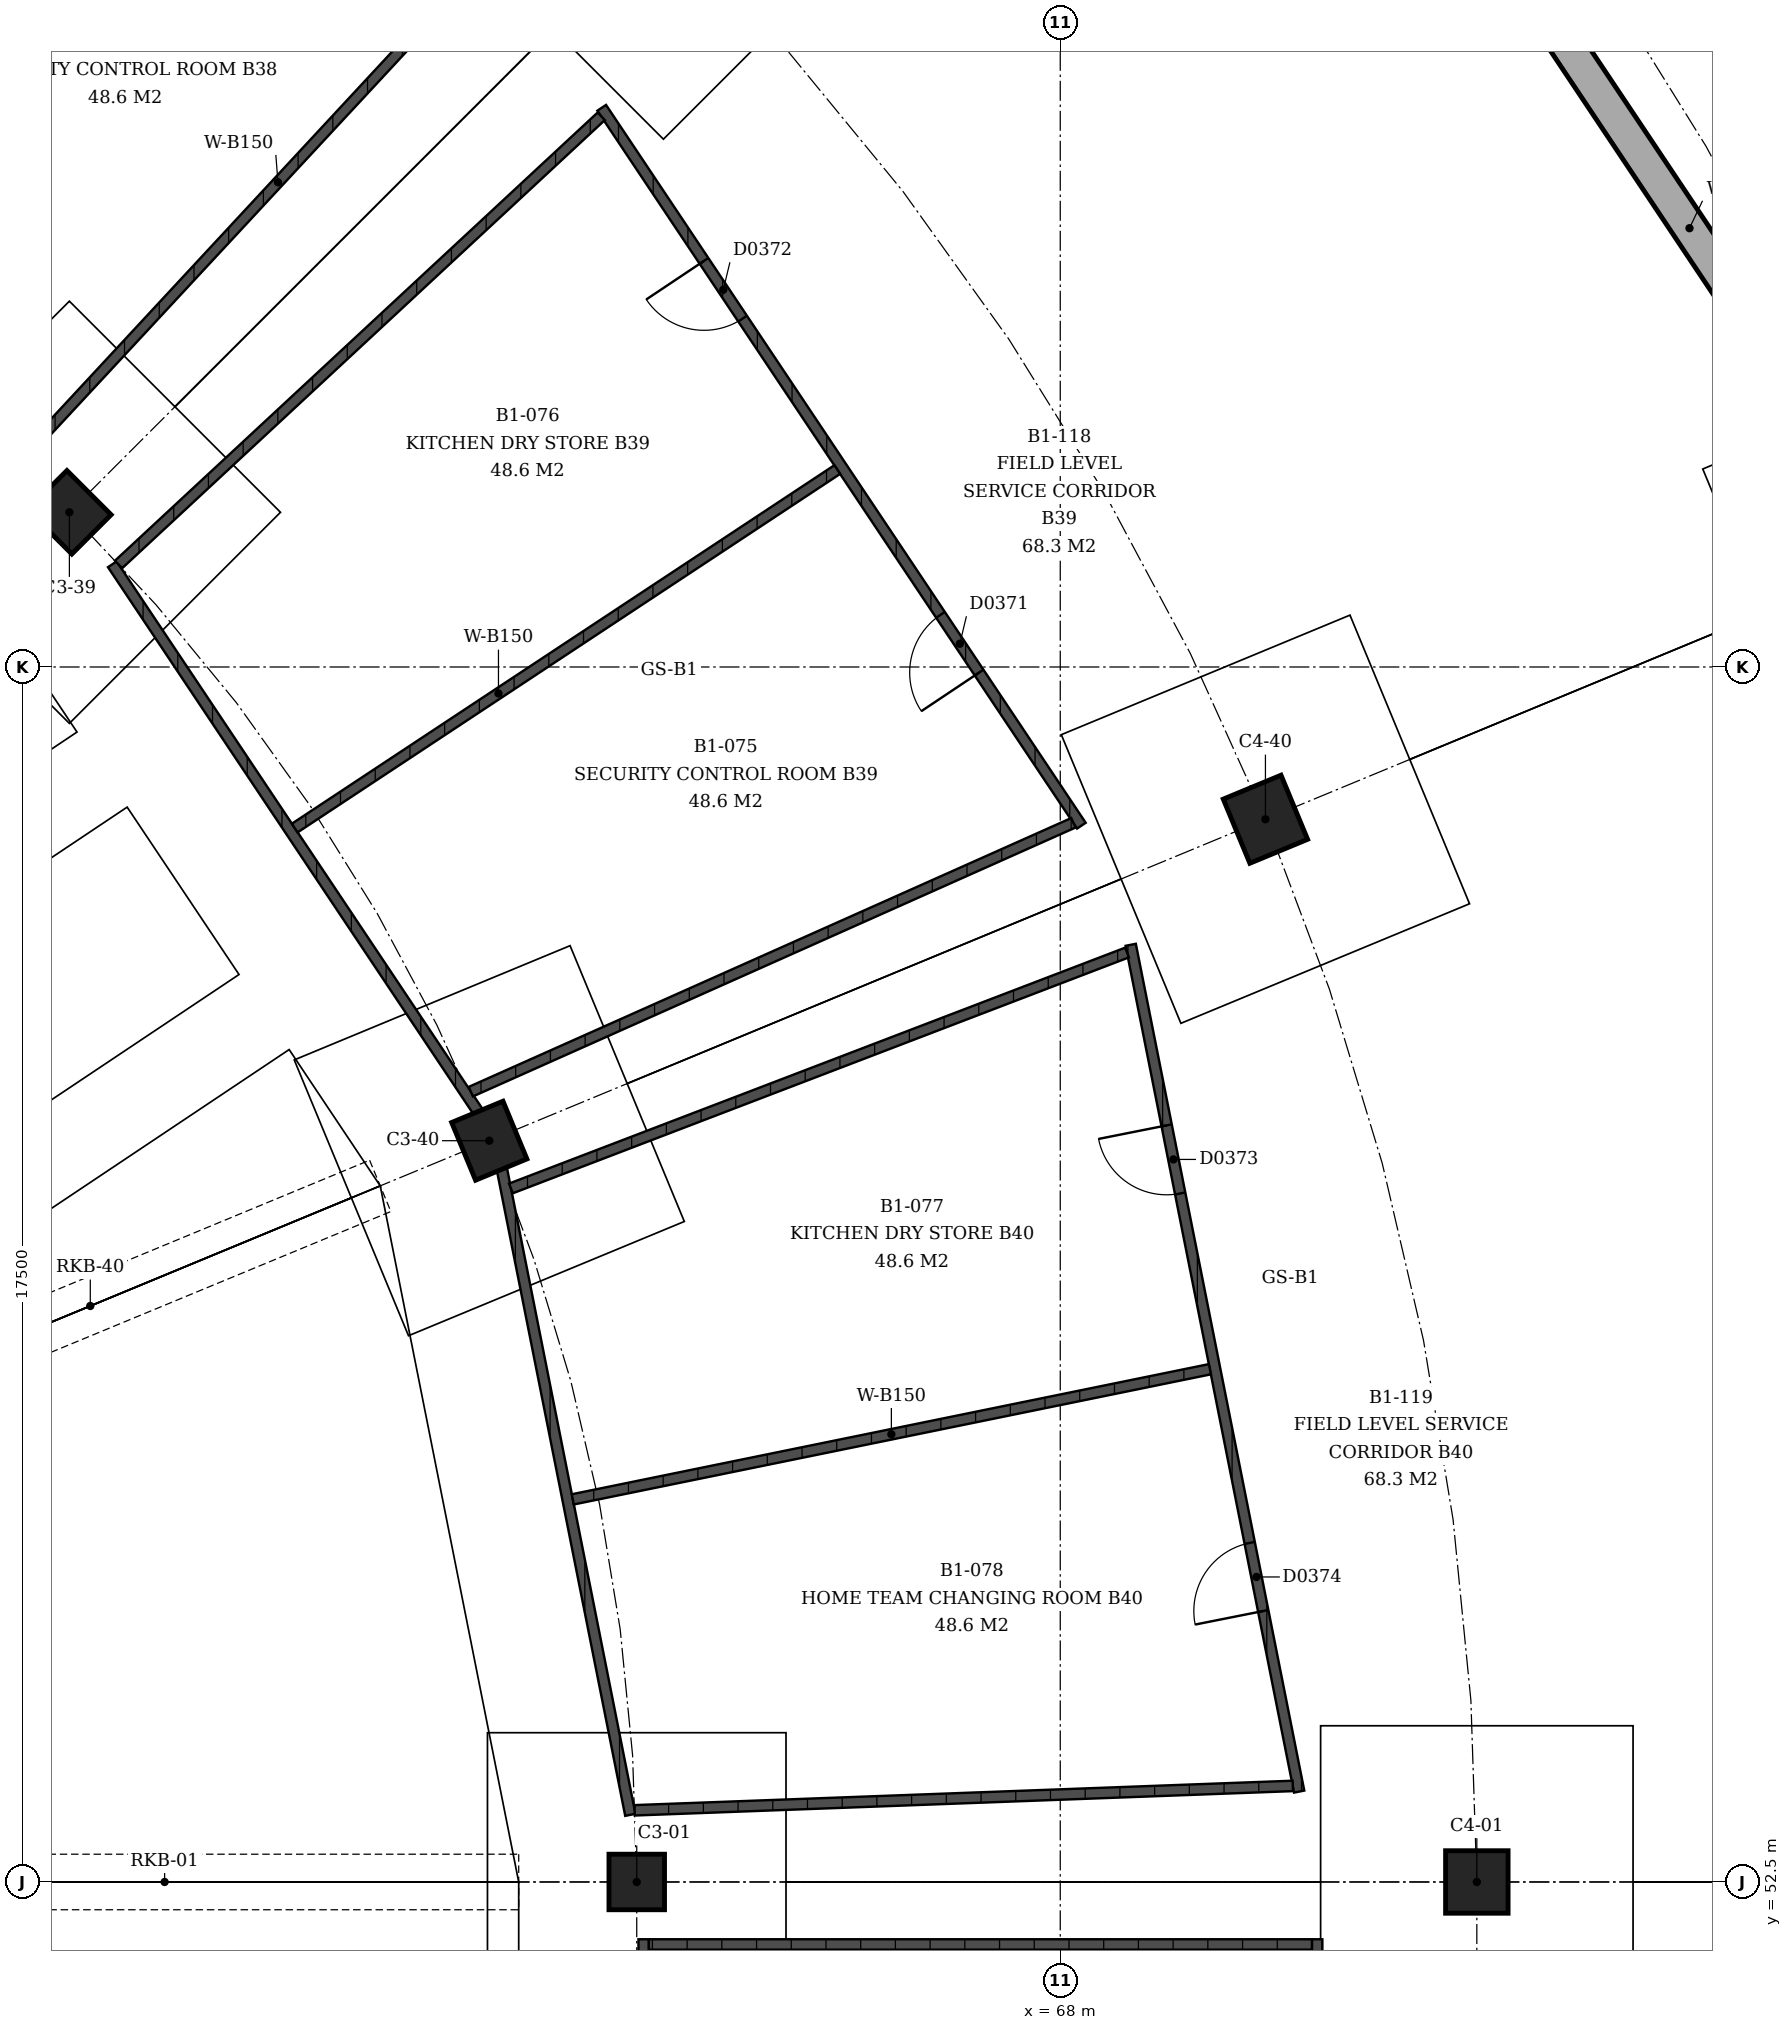
"""IFC4 building model, lengths in metres.
Left out: names, types, materials, properties, quantities, classifications, styles, units other than length and angle.
Written with IfcOpenShell. Run it as: python <this file> out.ifc"""

import sys

from ifc_helpers import new_model, si_unit, direction, frame, frame_2d, origin, origin_2d, place, context, subcontext, project, spatial, polyline, rectangle, outline, extrude, element, fill, save


model = new_model("IFC4")
c1 = context("Model", 3, precision=1e-05, world=origin(), true_north=direction((0.0, 1.0)))
c2 = subcontext(c1, "Body", "Model", "MODEL_VIEW")
j1 = project(units=[si_unit("LENGTHUNIT", "METRE"), si_unit("PLANEANGLEUNIT", "RADIAN")], contexts=[c1])
p1 = place(None, origin())
s1 = spatial("IfcSite", under=j1, at=p1, CompositionType="ELEMENT")
p2 = place(p1, origin())
s2 = spatial("IfcBuilding", under=s1, at=p2, CompositionType="ELEMENT")
p3 = place(p2, frame((0.0, 0.0, -4.5)))
s3 = spatial("IfcBuildingStorey", under=s2, at=p3, CompositionType="ELEMENT", Elevation=-4.5)
p4 = place(p3, frame((61.9, 52.5, 0.0), z_axis=(0.0, 0.0, 1.0), x_axis=(0.0, 1.0, 0.0)))
e1 = element("IfcColumn", 1, at=p4, inside=s3, PredefinedType="COLUMN", context=c2, shape_type="SweptSolid", body=[
    extrude(rectangle(XDim=0.8, YDim=0.8, at=origin_2d()), origin(), (0.0, 0.0, 1.0), 4.5),
])
p5 = place(p3, frame((74.0, 52.5, 0.0), z_axis=(0.0, 0.0, 1.0), x_axis=(0.0, 1.0, 0.0)))
e2 = element("IfcColumn", 2, at=p5, inside=s3, PredefinedType="COLUMN", context=c2, shape_type="SweptSolid", body=[
    extrude(rectangle(XDim=0.9, YDim=0.9, at=origin_2d()), origin(), (0.0, 0.0, 1.0), 4.5),
])
for number, where, z_axis, x_axis in (
    (3, (53.728, 72.228, 0.0), (0.0, 0.0, 1.0), (-0.707, 0.707, 0.0)),
    (4, (59.776, 63.177, 0.0), (0.0, 0.0, 1.0), (-0.383, 0.924, 0.0)),
):
    element("IfcColumn", number, at=place(p3, frame(where, z_axis=z_axis, x_axis=x_axis)), inside=s3, PredefinedType="COLUMN", context=c2, shape_type="SweptSolid", body=[
        extrude(rectangle(XDim=0.9, YDim=0.8, at=origin_2d()), origin(), (0.0, 0.0, 1.0), 4.5),
    ])
p6 = place(p3, frame((70.955, 67.807, 0.0), z_axis=(0.0, 0.0, 1.0), x_axis=(-0.382683432365, 0.923879532511, 0.0)))
e5 = element("IfcColumn", 5, at=p6, inside=s3, PredefinedType="COLUMN", context=c2, shape_type="SweptSolid", body=[
    extrude(rectangle(XDim=1.0, YDim=0.9, at=origin_2d()), origin(), (0.0, 0.0, 1.0), 4.5),
])
p7 = place(p3, frame((0.0, 0.0, -0.4)))
e6 = element("IfcWall", 6, at=p7, inside=s3, PredefinedType="SOLIDWALL", context=c2, shape_type="SweptSolid", body=[
    extrude(outline(polyline([(79.651, 72.005), (80.113, 72.196), (69.844, 87.566), (69.49, 87.212), (79.651, 72.005)])), origin(), (0.0, 0.0, 1.0), 3.19),
])
p8 = place(p3, frame((62.0, 38.0, 0.0), z_axis=(0.0, 0.0, 1.0), x_axis=(0.0, 1.0, 0.0)))
e7 = element("IfcWall", 7, at=p8, inside=s3, PredefinedType="SOLIDWALL", context=c2, shape_type="SweptSolid", body=[
    extrude(rectangle(XDim=13.675, YDim=0.15, at=frame_2d((6.837, 0.0))), origin(), (0.0, 0.0, 1.0), 3.0),
])
p9 = place(p3, frame((71.7, 38.325, 0.0), z_axis=(0.0, 0.0, 1.0), x_axis=(0.0, 1.0, 0.0)))
e8 = element("IfcWall", 8, at=p9, inside=s3, PredefinedType="SOLIDWALL", context=c2, shape_type="SweptSolid", body=[
    extrude(rectangle(XDim=13.35, YDim=0.15, at=frame_2d((6.675, 0.0))), origin(), (0.0, 0.0, 1.0), 3.0),
])
p10 = place(p9, frame((2.875, 0.0, 0.0)))
e9 = element("IfcOpeningElement", 9, at=p10, cuts=e8, PredefinedType="OPENING", context=c2, shape_type="SweptSolid", body=[
    extrude(rectangle(XDim=1.0, YDim=2.1, at=frame_2d((0.5, 1.05))), frame((0.0, 0.075, 0.0), z_axis=(0.0, -1.0, 0.0), x_axis=(1.0, 0.0, 0.0)), (0.0, 0.0, 1.0), 0.15),
])
p11 = place(p9, frame((9.475, 0.0, 0.0)))
e10 = element("IfcOpeningElement", 10, at=p11, cuts=e8, PredefinedType="OPENING", context=c2, shape_type="SweptSolid", body=[
    extrude(rectangle(XDim=1.0, YDim=2.1, at=frame_2d((0.5, 1.05))), frame((0.0, 0.075, 0.0), z_axis=(0.0, -1.0, 0.0), x_axis=(1.0, 0.0, 0.0)), (0.0, 0.0, 1.0), 0.15),
])
p12 = place(p3, frame((62.075, 51.6, 0.0), z_axis=(0.0, 0.0, 1.0), x_axis=(1.0, 0.0, 0.0)))
e11 = element("IfcWall", 11, at=p12, inside=s3, PredefinedType="SOLIDWALL", context=c2, shape_type="SweptSolid", body=[
    extrude(rectangle(XDim=9.55, YDim=0.15, at=frame_2d((4.775, 0.0))), origin(), (0.0, 0.0, 1.0), 3.0),
])
p13 = place(p3, frame((49.18, 75.474, 0.0), z_axis=(0.0, 0.0, 1.0), x_axis=(0.551278973714, 0.834320977287, 0.0)))
e12 = element("IfcWall", 12, at=p13, inside=s3, PredefinedType="SOLIDWALL", context=c2, shape_type="SweptSolid", body=[
    extrude(rectangle(XDim=9.366, YDim=0.15, at=frame_2d((4.683, 0.0))), origin(), (0.0, 0.0, 1.0), 3.0),
])
p14 = place(p3, frame((52.977, 72.937, 0.0), z_axis=(0.0, 0.0, 1.0), x_axis=(0.680436292727, 0.732807240371, 0.0)))
e13 = element("IfcWall", 13, at=p14, inside=s3, PredefinedType="SOLIDWALL", context=c2, shape_type="SweptSolid", body=[
    extrude(rectangle(XDim=9.487, YDim=0.15, at=frame_2d((4.743, 0.0))), origin(), (0.0, 0.0, 1.0), 3.0),
])
p15 = place(p3, frame((59.614, 63.597, 0.0), z_axis=(0.0, 0.0, 1.0), x_axis=(-0.555579425305, 0.831463470141, 0.0)))
e14 = element("IfcWall", 14, at=p15, inside=s3, PredefinedType="SOLIDWALL", context=c2, shape_type="SweptSolid", body=[
    extrude(rectangle(XDim=9.48, YDim=0.15, at=frame_2d((4.74, 0.0))), origin(), (0.0, 0.0, 1.0), 3.0),
])
p16 = place(p3, frame((68.304, 67.714, 0.0), z_axis=(0.0, 0.0, 1.0), x_axis=(-0.555560709334, 0.831475975747, 0.0)))
e15 = element("IfcWall", 15, at=p16, inside=s3, PredefinedType="SOLIDWALL", context=c2, shape_type="SweptSolid", body=[
    extrude(rectangle(XDim=12.436, YDim=0.15, at=frame_2d((6.218, 0.0))), origin(), (0.0, 0.0, 1.0), 3.0),
])
p17 = place(p16, frame((2.652, 0.0, 0.0)))
e16 = element("IfcOpeningElement", 16, at=p17, cuts=e15, PredefinedType="OPENING", context=c2, shape_type="SweptSolid", body=[
    extrude(rectangle(XDim=1.0, YDim=2.1, at=frame_2d((0.5, 1.05))), frame((0.0, 0.075, 0.0), z_axis=(0.0, -1.0, 0.0), x_axis=(1.0, 0.0, 0.0)), (0.0, 0.0, 1.0), 0.15),
])
p18 = place(p16, frame((8.784, 0.0, 0.0)))
e17 = element("IfcOpeningElement", 17, at=p18, cuts=e15, PredefinedType="OPENING", context=c2, shape_type="SweptSolid", body=[
    extrude(rectangle(XDim=1.0, YDim=2.1, at=frame_2d((0.5, 1.05))), frame((0.0, 0.075, 0.0), z_axis=(0.0, -1.0, 0.0), x_axis=(1.0, 0.0, 0.0)), (0.0, 0.0, 1.0), 0.15),
])
p19 = place(p3, frame((59.51, 63.883, 0.0), z_axis=(0.0, 0.0, 1.0), x_axis=(0.913203450279, 0.407503936666, 0.0)))
e18 = element("IfcWall", 18, at=p19, inside=s3, PredefinedType="SOLIDWALL", context=c2, shape_type="SweptSolid", body=[
    extrude(rectangle(XDim=9.502, YDim=0.15, at=frame_2d((4.751, 0.0))), origin(), (0.0, 0.0, 1.0), 3.0),
])
p20 = place(p3, frame((56.974, 67.68, 0.0), z_axis=(0.0, 0.0, 1.0), x_axis=(0.834320977287, 0.551278973714, 0.0)))
e19 = element("IfcWall", 19, at=p20, inside=s3, PredefinedType="SOLIDWALL", context=c2, shape_type="SweptSolid", body=[
    extrude(rectangle(XDim=9.366, YDim=0.15, at=frame_2d((4.683, 0.0))), origin(), (0.0, 0.0, 1.0), 3.0),
])
p21 = place(p3, frame((54.437, 71.477, 0.0), z_axis=(0.0, 0.0, 1.0), x_axis=(0.732807240371, 0.680436292727, 0.0)))
e20 = element("IfcWall", 20, at=p21, inside=s3, PredefinedType="SOLIDWALL", context=c2, shape_type="SweptSolid", body=[
    extrude(rectangle(XDim=9.487, YDim=0.15, at=frame_2d((4.743, 0.0))), origin(), (0.0, 0.0, 1.0), 3.0),
])
p22 = place(p3, frame((59.958, 62.765, 0.0), z_axis=(0.0, 0.0, 1.0), x_axis=(0.195076015612, -0.980788126016, 0.0)))
e21 = element("IfcWall", 21, at=p22, inside=s3, PredefinedType="SOLIDWALL", context=c2, shape_type="SweptSolid", body=[
    extrude(rectangle(XDim=9.48, YDim=0.15, at=frame_2d((4.74, 0.0))), origin(), (0.0, 0.0, 1.0), 3.0),
])
p23 = place(p3, frame((69.015, 65.999, 0.0), z_axis=(0.0, 0.0, 1.0), x_axis=(0.195089091876, -0.980785525093, 0.0)))
e22 = element("IfcWall", 22, at=p23, inside=s3, PredefinedType="SOLIDWALL", context=c2, shape_type="SweptSolid", body=[
    extrude(rectangle(XDim=12.436, YDim=0.15, at=frame_2d((6.218, 0.0))), origin(), (0.0, 0.0, 1.0), 3.0),
])
p24 = place(p23, frame((2.652, 0.0, 0.0)))
e23 = element("IfcOpeningElement", 23, at=p24, cuts=e22, PredefinedType="OPENING", context=c2, shape_type="SweptSolid", body=[
    extrude(rectangle(XDim=1.0, YDim=2.1, at=frame_2d((0.5, 1.05))), frame((0.0, 0.075, 0.0), z_axis=(0.0, -1.0, 0.0), x_axis=(1.0, 0.0, 0.0)), (0.0, 0.0, 1.0), 0.15),
])
p25 = place(p23, frame((8.784, 0.0, 0.0)))
e24 = element("IfcOpeningElement", 24, at=p25, cuts=e22, PredefinedType="OPENING", context=c2, shape_type="SweptSolid", body=[
    extrude(rectangle(XDim=1.0, YDim=2.1, at=frame_2d((0.5, 1.05))), frame((0.0, 0.075, 0.0), z_axis=(0.0, -1.0, 0.0), x_axis=(1.0, 0.0, 0.0)), (0.0, 0.0, 1.0), 0.15),
])
p26 = place(p3, frame((60.088, 62.49, 0.0), z_axis=(0.0, 0.0, 1.0), x_axis=(0.93388157938, 0.357582432029, 0.0)))
e25 = element("IfcWall", 25, at=p26, inside=s3, PredefinedType="SOLIDWALL", context=c2, shape_type="SweptSolid", body=[
    extrude(rectangle(XDim=9.502, YDim=0.15, at=frame_2d((4.751, 0.0))), origin(), (0.0, 0.0, 1.0), 3.0),
])
p27 = place(p3, frame((60.979, 58.011, 0.0), z_axis=(0.0, 0.0, 1.0), x_axis=(0.979770487126, 0.200124442675, 0.0)))
e26 = element("IfcWall", 26, at=p27, inside=s3, PredefinedType="SOLIDWALL", context=c2, shape_type="SweptSolid", body=[
    extrude(rectangle(XDim=9.367, YDim=0.15, at=frame_2d((4.683, 0.0))), origin(), (0.0, 0.0, 1.0), 3.0),
])
p28 = place(p3, frame((61.87, 53.532, 0.0), z_axis=(0.0, 0.0, 1.0), x_axis=(0.999315010022, 0.037006901301, 0.0)))
e27 = element("IfcWall", 27, at=p28, inside=s3, PredefinedType="SOLIDWALL", context=c2, shape_type="SweptSolid", body=[
    extrude(rectangle(XDim=9.487, YDim=0.15, at=frame_2d((4.743, 0.0))), origin(), (0.0, 0.0, 1.0), 3.0),
])
p29 = place(p17, origin())
e28 = element("IfcDoor", 28, at=p29, inside=s3, OperationType="SINGLE_SWING_RIGHT", PredefinedType="DOOR", context=c2, shape_type="SweptSolid", body=[
    extrude(rectangle(XDim=1.0, YDim=2.1, at=frame_2d((0.5, 1.05))), frame((0.0, 0.025, 0.0), z_axis=(0.0, -1.0, 0.0), x_axis=(1.0, 0.0, 0.0)), (0.0, 0.0, 1.0), 0.05),
])
fill(e16, e28)
p30 = place(p18, origin())
e29 = element("IfcDoor", 29, at=p30, inside=s3, OperationType="SINGLE_SWING_LEFT", PredefinedType="DOOR", context=c2, shape_type="SweptSolid", body=[
    extrude(rectangle(XDim=1.0, YDim=2.1, at=frame_2d((0.5, 1.05))), frame((0.0, 0.025, 0.0), z_axis=(0.0, -1.0, 0.0), x_axis=(1.0, 0.0, 0.0)), (0.0, 0.0, 1.0), 0.05),
])
fill(e17, e29)
p31 = place(p24, origin())
e30 = element("IfcDoor", 30, at=p31, inside=s3, OperationType="SINGLE_SWING_LEFT", PredefinedType="DOOR", context=c2, shape_type="SweptSolid", body=[
    extrude(rectangle(XDim=1.0, YDim=2.1, at=frame_2d((0.5, 1.05))), frame((0.0, 0.025, 0.0), z_axis=(0.0, -1.0, 0.0), x_axis=(1.0, 0.0, 0.0)), (0.0, 0.0, 1.0), 0.05),
])
fill(e23, e30)
p32 = place(p25, origin())
e31 = element("IfcDoor", 31, at=p32, inside=s3, OperationType="SINGLE_SWING_RIGHT", PredefinedType="DOOR", context=c2, shape_type="SweptSolid", body=[
    extrude(rectangle(XDim=1.0, YDim=2.1, at=frame_2d((0.5, 1.05))), frame((0.0, 0.025, 0.0), z_axis=(0.0, -1.0, 0.0), x_axis=(1.0, 0.0, 0.0)), (0.0, 0.0, 1.0), 0.05),
])
fill(e24, e31)
save(model, sys.argv[1])
